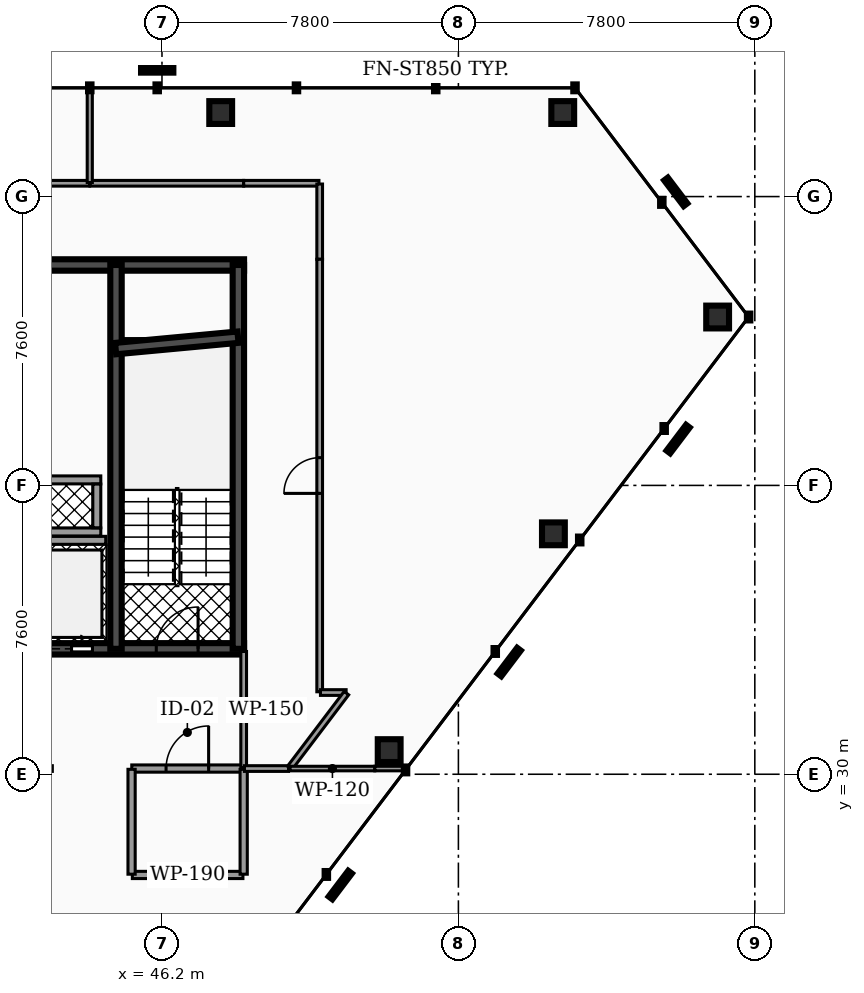
"""IFC4 building model, lengths in metres.
Left out: names, types, materials, properties, quantities, classifications, styles, units other than length and angle.
Written with IfcOpenShell. Run it as: python <this file> out.ifc"""

import sys

from ifc_helpers import new_model, si_unit, direction, frame, frame_2d, origin, origin_2d, place, context, subcontext, project, spatial, rectangle, hollow_rectangle, extrude, element, fill, save


model = new_model("IFC4")
c1 = context("Model", 3, precision=1e-05, world=origin(), true_north=direction((0.0, 1.0)))
c2 = subcontext(c1, "Body", "Model", "MODEL_VIEW")
j1 = project(units=[si_unit("LENGTHUNIT", "METRE"), si_unit("PLANEANGLEUNIT", "RADIAN")], contexts=[c1])
p1 = place(None, origin())
s1 = spatial("IfcSite", under=j1, at=p1, CompositionType="ELEMENT")
p2 = place(p1, origin())
s2 = spatial("IfcBuilding", under=s1, at=p2, CompositionType="ELEMENT")
p3 = place(p2, frame((0.0, 0.0, 239.36)))
s3 = spatial("IfcBuildingStorey", under=s2, at=p3, CompositionType="ELEMENT", Elevation=239.36)
p4 = place(p3, frame((28.5, 43.4, 0.0), z_axis=(0.0, 0.0, 1.0), x_axis=(1.0, 0.0, 0.0)))
e1 = element("IfcWall", 1, at=p4, inside=s3, PredefinedType="SHEAR", context=c2, shape_type="SweptSolid", body=[
    extrude(rectangle(XDim=19.86, YDim=0.3, at=frame_2d((9.93, 0.0))), origin(), (0.0, 0.0, 1.0), 3.18),
])
p5 = place(p3, frame((28.5, 33.3, 0.0), z_axis=(0.0, 0.0, 1.0), x_axis=(1.0, 0.0, 0.0)))
e2 = element("IfcWall", 2, at=p5, inside=s3, PredefinedType="SHEAR", context=c2, shape_type="SweptSolid", body=[
    extrude(rectangle(XDim=19.86, YDim=0.3, at=frame_2d((9.93, 0.0))), origin(), (0.0, 0.0, 1.0), 3.18),
])
p6 = place(p5, frame((3.93, 0.0, 0.0)))
e3 = element("IfcOpeningElement", 3, at=p6, cuts=e2, PredefinedType="OPENING", context=c2, shape_type="SweptSolid", body=[
    extrude(rectangle(XDim=1.1, YDim=2.15, at=frame_2d((0.55, 1.075))), frame((0.0, 0.16, 0.0), z_axis=(0.0, -1.0, 0.0), x_axis=(1.0, 0.0, 0.0)), (0.0, 0.0, 1.0), 0.32),
])
p7 = place(p5, frame((14.77, 0.0, 0.0)))
e4 = element("IfcOpeningElement", 4, at=p7, cuts=e2, PredefinedType="OPENING", context=c2, shape_type="SweptSolid", body=[
    extrude(rectangle(XDim=1.1, YDim=2.15, at=frame_2d((0.55, 1.075))), frame((0.0, 0.16, 0.0), z_axis=(0.0, -1.0, 0.0), x_axis=(1.0, 0.0, 0.0)), (0.0, 0.0, 1.0), 0.32),
])
p8 = place(p5, frame((11.25, 0.0, 0.0)))
e5 = element("IfcOpeningElement", 5, at=p8, cuts=e2, PredefinedType="OPENING", context=c2, shape_type="SweptSolid", body=[
    extrude(rectangle(XDim=1.0, YDim=2.1, at=frame_2d((0.5, 1.05))), frame((0.0, 0.16, 0.0), z_axis=(0.0, -1.0, 0.0), x_axis=(1.0, 0.0, 0.0)), (0.0, 0.0, 1.0), 0.32),
])
p9 = place(p5, frame((12.95, 0.0, 0.0)))
e6 = element("IfcOpeningElement", 6, at=p9, cuts=e2, PredefinedType="OPENING", context=c2, shape_type="SweptSolid", body=[
    extrude(rectangle(XDim=1.0, YDim=2.1, at=frame_2d((0.5, 1.05))), frame((0.0, 0.16, 0.0), z_axis=(0.0, -1.0, 0.0), x_axis=(1.0, 0.0, 0.0)), (0.0, 0.0, 1.0), 0.32),
])
p10 = place(p5, frame((5.85, 0.0, 0.0)))
e7 = element("IfcOpeningElement", 7, at=p10, cuts=e2, PredefinedType="OPENING", context=c2, shape_type="SweptSolid", body=[
    extrude(rectangle(XDim=1.0, YDim=2.1, at=frame_2d((0.5, 1.05))), frame((0.0, 0.16, 0.0), z_axis=(0.0, -1.0, 0.0), x_axis=(1.0, 0.0, 0.0)), (0.0, 0.0, 1.0), 0.32),
])
p11 = place(p5, frame((1.21, 0.0, 0.0)))
e8 = element("IfcOpeningElement", 8, at=p11, cuts=e2, PredefinedType="OPENING", context=c2, shape_type="SweptSolid", body=[
    extrude(rectangle(XDim=1.1, YDim=2.2, at=frame_2d((0.55, 1.1))), frame((0.0, 0.16, 0.0), z_axis=(0.0, -1.0, 0.0), x_axis=(1.0, 0.0, 0.0)), (0.0, 0.0, 1.0), 0.32),
])
p12 = place(p5, frame((9.34, 0.0, 0.0)))
e9 = element("IfcOpeningElement", 9, at=p12, cuts=e2, PredefinedType="OPENING", context=c2, shape_type="SweptSolid", body=[
    extrude(rectangle(XDim=1.12, YDim=2.05, at=frame_2d((0.56, 1.025))), frame((0.0, 0.16, 0.0), z_axis=(0.0, -1.0, 0.0), x_axis=(1.0, 0.0, 0.0)), (0.0, 0.0, 1.0), 0.32),
])
p13 = place(p5, frame((17.55, 0.0, 0.0)))
e10 = element("IfcOpeningElement", 10, at=p13, cuts=e2, PredefinedType="OPENING", context=c2, shape_type="SweptSolid", body=[
    extrude(rectangle(XDim=1.1, YDim=2.2, at=frame_2d((0.55, 1.1))), frame((0.0, 0.16, 0.0), z_axis=(0.0, -1.0, 0.0), x_axis=(1.0, 0.0, 0.0)), (0.0, 0.0, 1.0), 0.32),
])
for number, where, z_axis, x_axis in (
    (11, (44.99, 33.3, 0.0), (0.0, 0.0, 1.0), (0.0, 1.0, 0.0)),
    (12, (48.21, 33.3, 0.0), (0.0, 0.0, 1.0), (0.0, 1.0, 0.0)),
):
    element("IfcWall", number, at=place(p3, frame(where, z_axis=z_axis, x_axis=x_axis)), inside=s3, PredefinedType="SHEAR", context=c2, shape_type="SweptSolid", body=[
        extrude(rectangle(XDim=10.1, YDim=0.3, at=frame_2d((5.05, 0.0))), origin(), (0.0, 0.0, 1.0), 3.18),
    ])
p14 = place(p3, frame((44.98, 41.2, 0.0), z_axis=(0.0, 0.0, 1.0), x_axis=(0.995686468965, 0.09278176286, 0.0)))
e13 = element("IfcWall", 13, at=p14, inside=s3, PredefinedType="SHEAR", context=c2, shape_type="SweptSolid", body=[
    extrude(rectangle(XDim=3.234, YDim=0.3, at=frame_2d((1.617, 0.0))), origin(), (0.0, 0.0, 1.0), 3.18),
])
for number, where, z_axis, x_axis in (
    (14, (56.746, 47.411, 0.0), (0.0, 0.0, 1.0), (1.0, 0.0, 0.0)),
    (15, (47.745, 47.411, 0.0), (0.0, 0.0, 1.0), (1.0, 0.0, 0.0)),
    (16, (52.178, 30.622, 0.0), (0.0, 0.0, 1.0), (1.0, 0.0, 0.0)),
    (17, (56.5, 36.326, 0.0), (0.0, 0.0, 1.0), (1.0, 0.0, 0.0)),
    (18, (60.822, 42.031, 0.0), (0.0, 0.0, 1.0), (1.0, 0.0, 0.0)),
):
    element("IfcColumn", number, at=place(p3, frame(where, z_axis=z_axis, x_axis=x_axis)), inside=s3, PredefinedType="COLUMN", context=c2, shape_type="SweptSolid", body=[
        extrude(hollow_rectangle(XDim=0.6, YDim=0.6, WallThickness=0.03, at=origin_2d()), origin(), (0.0, 0.0, 1.0), 3.18),
    ])
p15 = place(p3, frame((42.92, 36.155, 0.0), z_axis=(0.0, 0.0, 1.0), x_axis=(1.0, 0.0, 0.0)))
e19 = element("IfcWall", 19, at=p15, inside=s3, PredefinedType="SOLIDWALL", context=c2, shape_type="SweptSolid", body=[
    extrude(rectangle(XDim=1.8, YDim=0.21, at=frame_2d((0.9, 0.0))), origin(), (0.0, 0.0, 1.0), 3.18),
])
for number, where, z_axis, x_axis in (
    (20, (42.99, 36.375, 0.0), (0.0, 0.0, 1.0), (1.0, 0.0, 0.0)),
    (21, (42.99, 37.745, 0.0), (0.0, 0.0, 1.0), (1.0, 0.0, 0.0)),
):
    element("IfcWall", number, at=place(p3, frame(where, z_axis=z_axis, x_axis=x_axis)), inside=s3, PredefinedType="SOLIDWALL", context=c2, shape_type="SweptSolid", body=[
        extrude(rectangle(XDim=1.6, YDim=0.21, at=frame_2d((0.8, 0.0))), origin(), (0.0, 0.0, 1.0), 3.18),
    ])
p16 = place(p3, frame((44.485, 36.485, 0.0), z_axis=(0.0, 0.0, 1.0), x_axis=(0.0, 1.0, 0.0)))
e22 = element("IfcWall", 22, at=p16, inside=s3, PredefinedType="SOLIDWALL", context=c2, shape_type="SweptSolid", body=[
    extrude(rectangle(XDim=1.15, YDim=0.21, at=frame_2d((0.575, 0.0))), origin(), (0.0, 0.0, 1.0), 3.18),
])
p17 = place(p3, frame((45.405, 30.15, 0.0), z_axis=(0.0, 0.0, 1.0), x_axis=(1.0, 0.0, 0.0)))
e23 = element("IfcWall", 23, at=p17, inside=s3, PredefinedType="PARTITIONING", context=c2, shape_type="SweptSolid", body=[
    extrude(rectangle(XDim=2.925, YDim=0.19, at=frame_2d((1.462, 0.0))), origin(), (0.0, 0.0, 1.0), 2.235),
])
p18 = place(p17, frame((0.903, 0.0, 0.0)))
e24 = element("IfcOpeningElement", 24, at=p18, cuts=e23, PredefinedType="OPENING", context=c2, shape_type="SweptSolid", body=[
    extrude(rectangle(XDim=1.12, YDim=2.05, at=frame_2d((0.56, 1.025))), frame((0.0, 0.105, 0.0), z_axis=(0.0, -1.0, 0.0), x_axis=(1.0, 0.0, 0.0)), (0.0, 0.0, 1.0), 0.21),
])
p19 = place(p3, frame((48.35, 30.17, 0.0), z_axis=(0.0, 0.0, 1.0), x_axis=(0.0, 1.0, 0.0)))
e25 = element("IfcWall", 25, at=p19, inside=s3, PredefinedType="PARTITIONING", context=c2, shape_type="SweptSolid", body=[
    extrude(rectangle(XDim=3.06, YDim=0.15, at=frame_2d((1.53, 0.0))), origin(), (0.0, 0.0, 1.0), 2.235),
])
p20 = place(p3, frame((33.485, 30.15, 0.0), z_axis=(0.0, 0.0, 1.0), x_axis=(1.0, 0.0, 0.0)))
e26 = element("IfcWall", 26, at=p20, inside=s3, PredefinedType="PARTITIONING", context=c2, shape_type="SweptSolid", body=[
    extrude(rectangle(XDim=9.83, YDim=0.15, at=frame_2d((4.915, 0.0))), origin(), (0.0, 0.0, 1.0), 2.235),
])
p21 = place(p20, frame((0.445, 0.0, 0.0)))
e27 = element("IfcOpeningElement", 27, at=p21, cuts=e26, PredefinedType="OPENING", context=c2, shape_type="SweptSolid", body=[
    extrude(rectangle(XDim=0.94, YDim=2.05, at=frame_2d((0.47, 1.025))), frame((0.0, 0.085, 0.0), z_axis=(0.0, -1.0, 0.0), x_axis=(1.0, 0.0, 0.0)), (0.0, 0.0, 1.0), 0.17),
])
p22 = place(p3, frame((45.42, 27.35, 0.0), z_axis=(0.0, 0.0, 1.0), x_axis=(1.0, 0.0, 0.0)))
e28 = element("IfcWall", 28, at=p22, inside=s3, PredefinedType="PARTITIONING", context=c2, shape_type="SweptSolid", body=[
    extrude(rectangle(XDim=2.91, YDim=0.19, at=frame_2d((1.455, 0.0))), origin(), (0.0, 0.0, 1.0), 2.235),
])
for number, where, z_axis, x_axis in (
    (29, (45.4, 27.37, 0.0), (0.0, 0.0, 1.0), (0.0, 1.0, 0.0)),
    (30, (48.35, 27.37, 0.0), (0.0, 0.0, 1.0), (0.0, 1.0, 0.0)),
):
    element("IfcWall", number, at=place(p3, frame(where, z_axis=z_axis, x_axis=x_axis)), inside=s3, PredefinedType="PARTITIONING", context=c2, shape_type="SweptSolid", body=[
        extrude(rectangle(XDim=2.76, YDim=0.19, at=frame_2d((1.38, 0.0))), origin(), (0.0, 0.0, 1.0), 2.235),
    ])
p23 = place(p3, frame((48.37, 30.15, 0.0), z_axis=(0.0, 0.0, 1.0), x_axis=(1.0, 0.0, 0.0)))
e31 = element("IfcWall", 31, at=p23, inside=s3, PredefinedType="PARTITIONING", context=c2, shape_type="SweptSolid", body=[
    extrude(rectangle(XDim=1.16, YDim=0.15, at=frame_2d((0.58, 0.0))), origin(), (0.0, 0.0, 1.0), 2.235),
])
p24 = place(p3, frame((44.305, 45.55, 0.0), z_axis=(0.0, 0.0, 1.0), x_axis=(1.0, 0.0, 0.0)))
e32 = element("IfcWall", 32, at=p24, inside=s3, PredefinedType="PARTITIONING", context=c2, shape_type="SweptSolid", body=[
    extrude(rectangle(XDim=4.045, YDim=0.15, at=frame_2d((2.022, 0.0))), origin(), (0.0, 0.0, 1.0), 2.235),
])
for number, where, z_axis, x_axis in (
    (33, (48.35, 45.55, 0.0), (0.0, 0.0, 1.0), (1.0, 0.0, 0.0)),
    (34, (50.35, 43.55, 0.0), (0.0, 0.0, 1.0), (0.0, 1.0, 0.0)),
):
    element("IfcWall", number, at=place(p3, frame(where, z_axis=z_axis, x_axis=x_axis)), inside=s3, PredefinedType="PARTITIONING", context=c2, shape_type="SweptSolid", body=[
        extrude(rectangle(XDim=1.98, YDim=0.15, at=frame_2d((0.99, 0.0))), origin(), (0.0, 0.0, 1.0), 2.235),
    ])
p25 = place(p3, frame((50.35, 32.17, 0.0), z_axis=(0.0, 0.0, 1.0), x_axis=(0.0, 1.0, 0.0)))
e35 = element("IfcWall", 35, at=p25, inside=s3, PredefinedType="PARTITIONING", context=c2, shape_type="SweptSolid", body=[
    extrude(rectangle(XDim=11.38, YDim=0.15, at=frame_2d((5.69, 0.0))), origin(), (0.0, 0.0, 1.0), 2.235),
])
p26 = place(p25, frame((5.22, 0.0, 0.0)))
e36 = element("IfcOpeningElement", 36, at=p26, cuts=e35, PredefinedType="OPENING", context=c2, shape_type="SweptSolid", body=[
    extrude(rectangle(XDim=0.94, YDim=2.05, at=frame_2d((0.47, 1.025))), frame((0.0, 0.085, 0.0), z_axis=(0.0, -1.0, 0.0), x_axis=(1.0, 0.0, 0.0)), (0.0, 0.0, 1.0), 0.17),
])
p27 = place(p3, frame((50.37, 32.15, 0.0), z_axis=(0.0, 0.0, 1.0), x_axis=(1.0, 0.0, 0.0)))
e37 = element("IfcWall", 37, at=p27, inside=s3, PredefinedType="PARTITIONING", context=c2, shape_type="SweptSolid", body=[
    extrude(rectangle(XDim=0.675, YDim=0.15, at=frame_2d((0.338, 0.0))), origin(), (0.0, 0.0, 1.0), 2.235),
])
p28 = place(p3, frame((49.562, 30.166, 0.0), z_axis=(0.0, 0.0, 1.0), x_axis=(0.603806281462, 0.797131089889, 0.0)))
e38 = element("IfcWall", 38, at=p28, inside=s3, PredefinedType="PARTITIONING", context=c2, shape_type="SweptSolid", body=[
    extrude(rectangle(XDim=2.469, YDim=0.15, at=frame_2d((1.234, 0.0))), origin(), (0.0, 0.0, 1.0), 2.235),
])
p29 = place(p3, frame((40.435, 45.55, 0.0), z_axis=(0.0, 0.0, 1.0), x_axis=(1.0, 0.0, 0.0)))
e39 = element("IfcWall", 39, at=p29, inside=s3, PredefinedType="PARTITIONING", context=c2, shape_type="SweptSolid", body=[
    extrude(rectangle(XDim=3.86, YDim=0.15, at=frame_2d((1.93, 0.0))), origin(), (0.0, 0.0, 1.0), 2.235),
])
p30 = place(p3, frame((49.57, 30.15, 0.0), z_axis=(0.0, 0.0, 1.0), x_axis=(1.0, 0.0, 0.0)))
e40 = element("IfcWall", 40, at=p30, inside=s3, PredefinedType="PARTITIONING", context=c2, shape_type="SweptSolid", body=[
    extrude(rectangle(XDim=2.23, YDim=0.12, at=frame_2d((1.115, 0.0))), origin(), (0.0, 0.0, 1.0), 2.235),
])
p31 = place(p3, frame((51.8, 30.15, 0.0), z_axis=(0.0, 0.0, 1.0), x_axis=(1.0, 0.0, 0.0)))
e41 = element("IfcWall", 41, at=p31, inside=s3, PredefinedType="PARTITIONING", context=c2, shape_type="SweptSolid", body=[
    extrude(rectangle(XDim=0.822, YDim=0.12, at=frame_2d((0.411, 0.0))), origin(), (0.0, 0.0, 1.0), 2.235),
])
p32 = place(p3, frame((44.3, 45.57, 0.0), z_axis=(0.0, 0.0, 1.0), x_axis=(0.0, 1.0, 0.0)))
e42 = element("IfcWall", 42, at=p32, inside=s3, PredefinedType="PARTITIONING", context=c2, shape_type="SweptSolid", body=[
    extrude(rectangle(XDim=2.476, YDim=0.135, at=frame_2d((1.238, 0.0))), origin(), (0.0, 0.0, 1.0), 2.235),
])
p33 = place(p7, origin())
e43 = element("IfcDoor", 43, at=p33, inside=s3, OperationType="SLIDING_TO_RIGHT", PredefinedType="DOOR", context=c2, shape_type="SweptSolid", body=[
    extrude(rectangle(XDim=1.1, YDim=2.15, at=frame_2d((0.55, 1.075))), frame((0.0, 0.025, 0.0), z_axis=(0.0, -1.0, 0.0), x_axis=(1.0, 0.0, 0.0)), (0.0, 0.0, 1.0), 0.05),
])
fill(e4, e43)
p34 = place(p13, origin())
e44 = element("IfcDoor", 44, at=p34, inside=s3, OperationType="SINGLE_SWING_RIGHT", PredefinedType="DOOR", context=c2, shape_type="SweptSolid", body=[
    extrude(rectangle(XDim=1.1, YDim=2.2, at=frame_2d((0.55, 1.1))), frame((0.0, 0.025, 0.0), z_axis=(0.0, -1.0, 0.0), x_axis=(1.0, 0.0, 0.0)), (0.0, 0.0, 1.0), 0.05),
])
fill(e10, e44)
p35 = place(p18, origin())
e45 = element("IfcDoor", 45, at=p35, inside=s3, OperationType="SINGLE_SWING_RIGHT", PredefinedType="DOOR", context=c2, shape_type="SweptSolid", body=[
    extrude(rectangle(XDim=1.12, YDim=2.05, at=frame_2d((0.56, 1.025))), frame((0.0, 0.025, 0.0), z_axis=(0.0, -1.0, 0.0), x_axis=(1.0, 0.0, 0.0)), (0.0, 0.0, 1.0), 0.05),
])
fill(e24, e45)
p36 = place(p26, origin())
e46 = element("IfcDoor", 46, at=p36, inside=s3, OperationType="SINGLE_SWING_LEFT", PredefinedType="DOOR", context=c2, shape_type="SweptSolid", body=[
    extrude(rectangle(XDim=0.94, YDim=2.05, at=frame_2d((0.47, 1.025))), frame((0.0, 0.025, 0.0), z_axis=(0.0, -1.0, 0.0), x_axis=(1.0, 0.0, 0.0)), (0.0, 0.0, 1.0), 0.05),
])
fill(e36, e46)
save(model, sys.argv[1])
